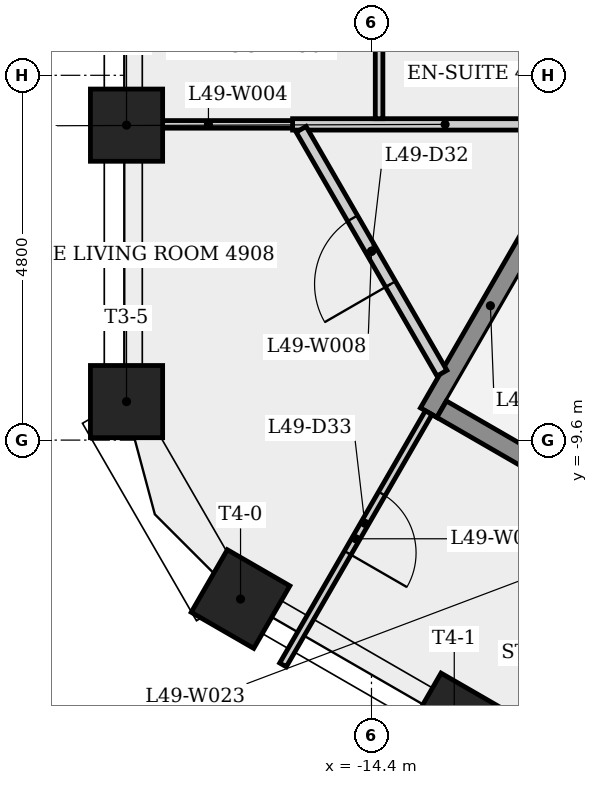
"""IFC4 building model, lengths in metres.
Left out: names, types, materials, properties, quantities, classifications, styles, units other than length and angle.
Written with IfcOpenShell. Run it as: python <this file> out.ifc"""

import sys

from ifc_helpers import new_model, si_unit, direction, frame, frame_2d, origin, origin_2d, place, context, subcontext, project, spatial, rectangle, extrude, element, fill, save


model = new_model("IFC4")
c1 = context("Model", 3, precision=1e-05, world=origin(), true_north=direction((0.0, 1.0)))
c2 = subcontext(c1, "Body", "Model", "MODEL_VIEW")
j1 = project(units=[si_unit("LENGTHUNIT", "METRE"), si_unit("PLANEANGLEUNIT", "RADIAN")], contexts=[c1])
p1 = place(None, origin())
s1 = spatial("IfcSite", under=j1, at=p1, CompositionType="ELEMENT")
p2 = place(p1, origin())
s2 = spatial("IfcBuilding", under=s1, at=p2, CompositionType="ELEMENT")
p3 = place(p2, frame((0.0, 0.0, 183.3)))
s3 = spatial("IfcBuildingStorey", under=s2, at=p3, CompositionType="ELEMENT", Elevation=183.3)
for number, where, z_axis, x_axis in (
    (1, (-17.623, -5.456, 0.0), (0.0, 0.0, 1.0), (-1.0, 0.0, 0.0)),
    (2, (-17.623, -9.094, 0.0), (0.0, 0.0, 1.0), (-1.0, 0.0, 0.0)),
    (3, (-16.123, -11.692, 0.0), (0.0, 0.0, 1.0), (-0.5, -0.866, 0.0)),
    (4, (-13.311, -13.315, 0.0), (0.0, 0.0, 1.0), (-0.5, -0.866, 0.0)),
):
    element("IfcColumn", number, at=place(p3, frame(where, z_axis=z_axis, x_axis=x_axis)), inside=s3, PredefinedType="COLUMN", context=c2, shape_type="SweptSolid", body=[
        extrude(rectangle(XDim=0.95, YDim=0.95, at=origin_2d()), origin(), (0.0, 0.0, 1.0), 3.4),
    ])
p4 = place(p3, frame((-15.438, -5.446, 0.0), z_axis=(0.0, 0.0, 1.0), x_axis=(1.0, 0.0, 0.0)))
e5 = element("IfcWall", 5, at=p4, inside=s3, PredefinedType="PARTITIONING", context=c2, shape_type="SweptSolid", body=[
    extrude(rectangle(XDim=4.013, YDim=0.15, at=frame_2d((2.007, 0.0))), origin(), (0.0, 0.0, 1.0), 3.0),
])
p5 = place(p3, frame((-15.438, -5.446, 0.0), z_axis=(0.0, 0.0, 1.0), x_axis=(-1.0, 0.0, 0.0)))
e6 = element("IfcWall", 6, at=p5, inside=s3, PredefinedType="PARTITIONING", context=c2, shape_type="SweptSolid", body=[
    extrude(rectangle(XDim=2.215, YDim=0.1, at=frame_2d((1.107, 0.0))), origin(), (0.0, 0.0, 1.0), 3.0),
])
p6 = place(p3, frame((-14.3, -3.465, 0.0), z_axis=(0.0, 0.0, 1.0), x_axis=(0.0, -1.0, 0.0)))
e7 = element("IfcWall", 7, at=p6, inside=s3, PredefinedType="PARTITIONING", context=c2, shape_type="SweptSolid", body=[
    extrude(rectangle(XDim=1.906, YDim=0.1, at=frame_2d((0.953, 0.0))), origin(), (0.0, 0.0, 1.0), 3.0),
])
p7 = place(p3, frame((-13.648, -9.239, 0.0), z_axis=(0.0, 0.0, 1.0), x_axis=(0.500017246033, 0.866015446554, 0.0)))
e8 = element("IfcWall", 8, at=p7, inside=s3, PredefinedType="SHEAR", context=c2, shape_type="SweptSolid", body=[
    extrude(rectangle(XDim=3.25, YDim=0.25, at=frame_2d((1.625, 0.0))), origin(), (0.0, 0.0, 1.0), 3.0),
])
p8 = place(p3, frame((-13.648, -9.239, 0.0), z_axis=(0.0, 0.0, 1.0), x_axis=(-0.500044099915, -0.86599994119, 0.0)))
e9 = element("IfcWall", 9, at=p8, inside=s3, PredefinedType="PARTITIONING", context=c2, shape_type="SweptSolid", body=[
    extrude(rectangle(XDim=3.833, YDim=0.1, at=frame_2d((1.917, 0.0))), origin(), (0.0, 0.0, 1.0), 3.0),
])
p9 = place(p8, frame((1.231, 0.0, 0.0)))
e10 = element("IfcOpeningElement", 10, at=p9, cuts=e9, PredefinedType="OPENING", context=c2, shape_type="SweptSolid", body=[
    extrude(rectangle(XDim=0.9, YDim=2.1, at=frame_2d((0.45, 1.05))), frame((0.0, 0.06, 0.0), z_axis=(0.0, -1.0, 0.0), x_axis=(1.0, 0.0, 0.0)), (0.0, 0.0, 1.0), 0.12),
])
p10 = place(p3, frame((-13.473, -8.719, 0.0), z_axis=(0.0, 0.0, 1.0), x_axis=(-0.500022870649, 0.866012199007, 0.0)))
e11 = element("IfcWall", 11, at=p10, inside=s3, PredefinedType="PARTITIONING", context=c2, shape_type="SweptSolid", body=[
    extrude(rectangle(XDim=3.705, YDim=0.15, at=frame_2d((1.853, 0.0))), origin(), (0.0, 0.0, 1.0), 3.0),
])
p11 = place(p10, frame((1.352, 0.0, 0.0)))
e12 = element("IfcOpeningElement", 12, at=p11, cuts=e11, PredefinedType="OPENING", context=c2, shape_type="SweptSolid", body=[
    extrude(rectangle(XDim=1.0, YDim=2.1, at=frame_2d((0.5, 1.05))), frame((0.0, 0.085, 0.0), z_axis=(0.0, -1.0, 0.0), x_axis=(1.0, 0.0, 0.0)), (0.0, 0.0, 1.0), 0.17),
])
p12 = place(p3, frame((-7.935, -12.393, 0.0), z_axis=(0.0, 0.0, 1.0), x_axis=(-0.866025499775, 0.499999833739, 0.0)))
e13 = element("IfcWall", 13, at=p12, inside=s3, PredefinedType="SHEAR", context=c2, shape_type="SweptSolid", body=[
    extrude(rectangle(XDim=6.4, YDim=0.25, at=frame_2d((3.2, 0.0))), origin(), (0.0, 0.0, 1.0), 3.0),
])
p13 = place(p11, origin())
e14 = element("IfcDoor", 14, at=p13, inside=s3, OperationType="SINGLE_SWING_LEFT", PredefinedType="DOOR", context=c2, shape_type="SweptSolid", body=[
    extrude(rectangle(XDim=1.0, YDim=2.1, at=frame_2d((0.5, 1.05))), frame((0.0, 0.025, 0.0), z_axis=(0.0, -1.0, 0.0), x_axis=(1.0, 0.0, 0.0)), (0.0, 0.0, 1.0), 0.05),
])
fill(e12, e14)
p14 = place(p9, origin())
e15 = element("IfcDoor", 15, at=p14, inside=s3, OperationType="SINGLE_SWING_RIGHT", PredefinedType="DOOR", context=c2, shape_type="SweptSolid", body=[
    extrude(rectangle(XDim=0.9, YDim=2.1, at=frame_2d((0.45, 1.05))), frame((0.0, 0.025, 0.0), z_axis=(0.0, -1.0, 0.0), x_axis=(1.0, 0.0, 0.0)), (0.0, 0.0, 1.0), 0.05),
])
fill(e10, e15)
save(model, sys.argv[1])
